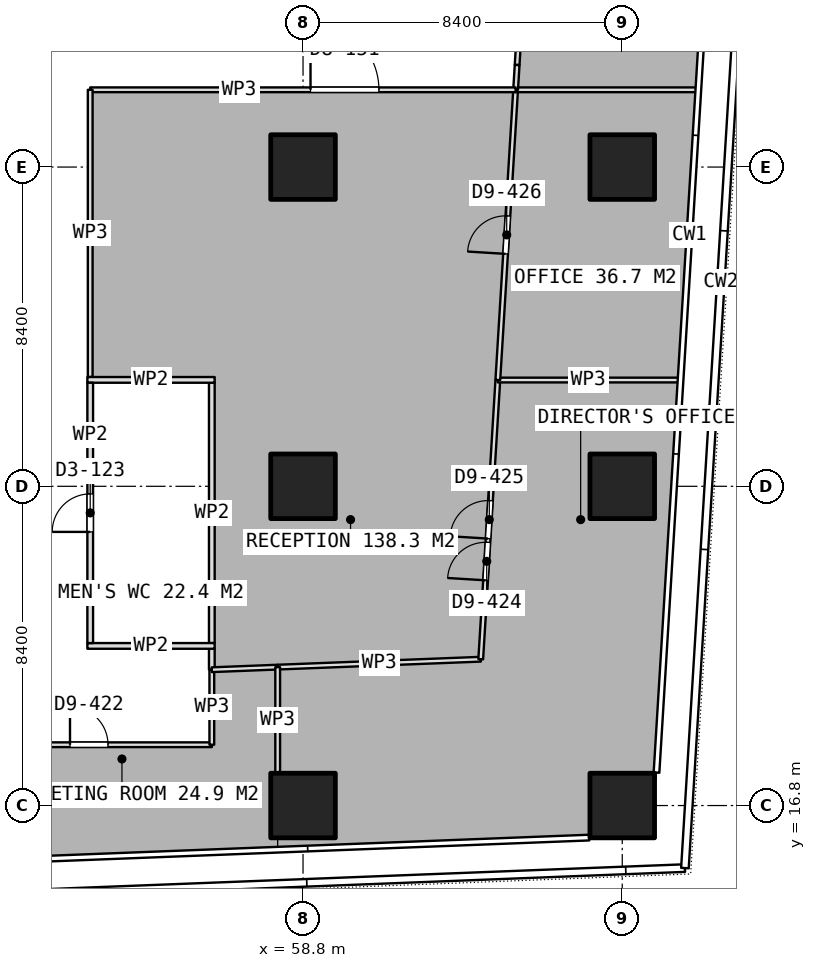
"""IFC4 building model, lengths in metres.
Left out: names, types, materials, properties, quantities, classifications, styles, units other than length and angle.
Written with IfcOpenShell. Run it as: python <this file> out.ifc"""

import sys

from ifc_helpers import new_model, si_unit, direction, frame, frame_2d, origin, origin_2d, place, context, subcontext, project, spatial, rectangle, extrude, element, fill, save


model = new_model("IFC4")
c1 = context("Model", 3, precision=1e-05, world=origin(), true_north=direction((0.0, 1.0)))
c2 = subcontext(c1, "Body", "Model", "MODEL_VIEW")
j1 = project(units=[si_unit("LENGTHUNIT", "METRE"), si_unit("PLANEANGLEUNIT", "RADIAN")], contexts=[c1])
p1 = place(None, origin())
s1 = spatial("IfcSite", under=j1, at=p1, CompositionType="ELEMENT")
p2 = place(p1, origin())
s2 = spatial("IfcBuilding", under=s1, at=p2, CompositionType="ELEMENT")
p3 = place(p2, frame((0.0, 0.0, 117.8)))
s3 = spatial("IfcBuildingStorey", under=s2, at=p3, CompositionType="ELEMENT", Elevation=117.8)
for number, where, z_axis, x_axis in (
    (1, (58.8, 16.8, 0.0), (0.0, 0.0, 1.0), (1.0, 0.0, 0.0)),
    (2, (58.8, 25.2, 0.0), (0.0, 0.0, 1.0), (1.0, 0.0, 0.0)),
    (3, (58.8, 33.6, 0.0), (0.0, 0.0, 1.0), (1.0, 0.0, 0.0)),
    (4, (67.2, 16.8, 0.0), (0.0, 0.0, 1.0), (1.0, 0.0, 0.0)),
    (5, (67.2, 25.2, 0.0), (0.0, 0.0, 1.0), (1.0, 0.0, 0.0)),
    (6, (67.2, 33.6, 0.0), (0.0, 0.0, 1.0), (1.0, 0.0, 0.0)),
):
    element("IfcColumn", number, at=place(p3, frame(where, z_axis=z_axis, x_axis=x_axis)), inside=s3, PredefinedType="COLUMN", context=c2, shape_type="SweptSolid", body=[
        extrude(rectangle(XDim=1.7, YDim=1.7, at=origin_2d()), origin(), (0.0, 0.0, 1.0), 3.75),
    ])
for number, where, z_axis, x_axis in (
    (7, (53.125, 21.0, 0.0), (0.0, 0.0, 1.0), (1.0, 0.0, 0.0)),
    (8, (53.125, 28.0, 0.0), (0.0, 0.0, 1.0), (1.0, 0.0, 0.0)),
):
    element("IfcWall", number, at=place(p3, frame(where, z_axis=z_axis, x_axis=x_axis)), inside=s3, PredefinedType="PARTITIONING", context=c2, shape_type="SweptSolid", body=[
        extrude(rectangle(XDim=3.35, YDim=0.15, at=frame_2d((1.675, 0.0))), origin(), (0.0, 0.0, 1.0), 3.5),
    ])
p4 = place(p3, frame((53.2, 21.075, 0.0), z_axis=(0.0, 0.0, 1.0), x_axis=(0.0, 1.0, 0.0)))
e9 = element("IfcWall", 9, at=p4, inside=s3, PredefinedType="PARTITIONING", context=c2, shape_type="SweptSolid", body=[
    extrude(rectangle(XDim=6.85, YDim=0.15, at=frame_2d((3.425, 0.0))), origin(), (0.0, 0.0, 1.0), 3.5),
])
p5 = place(p4, frame((2.925, 0.0, 0.0)))
e10 = element("IfcOpeningElement", 10, at=p5, cuts=e9, PredefinedType="OPENING", context=c2, shape_type="SweptSolid", body=[
    extrude(rectangle(XDim=1.0, YDim=2.1, at=frame_2d((0.5, 1.05))), frame((0.0, 0.085, 0.0), z_axis=(0.0, -1.0, 0.0), x_axis=(1.0, 0.0, 0.0)), (0.0, 0.0, 1.0), 0.17),
])
p6 = place(p3, frame((56.4, 21.075, 0.0), z_axis=(0.0, 0.0, 1.0), x_axis=(0.0, 1.0, 0.0)))
e11 = element("IfcWall", 11, at=p6, inside=s3, PredefinedType="PARTITIONING", context=c2, shape_type="SweptSolid", body=[
    extrude(rectangle(XDim=6.85, YDim=0.15, at=frame_2d((3.425, 0.0))), origin(), (0.0, 0.0, 1.0), 3.5),
])
p7 = place(p3, frame((49.937, 18.4, 0.0), z_axis=(0.0, 0.0, 1.0), x_axis=(1.0, 0.0, 0.0)))
e12 = element("IfcWall", 12, at=p7, inside=s3, PredefinedType="PARTITIONING", context=c2, shape_type="SweptSolid", body=[
    extrude(rectangle(XDim=6.463, YDim=0.125, at=frame_2d((3.231, 0.0))), origin(), (0.0, 0.0, 1.0), 3.5),
])
p8 = place(p7, frame((2.731, 0.0, 0.0)))
e13 = element("IfcOpeningElement", 13, at=p8, cuts=e12, PredefinedType="OPENING", context=c2, shape_type="SweptSolid", body=[
    extrude(rectangle(XDim=1.0, YDim=2.1, at=frame_2d((0.5, 1.05))), frame((0.0, 0.073, 0.0), z_axis=(0.0, -1.0, 0.0), x_axis=(1.0, 0.0, 0.0)), (0.0, 0.0, 1.0), 0.145),
])
p9 = place(p3, frame((56.4, 18.4, 0.0), z_axis=(0.0, 0.0, 1.0), x_axis=(0.0, 1.0, 0.0)))
e14 = element("IfcWall", 14, at=p9, inside=s3, PredefinedType="PARTITIONING", context=c2, shape_type="SweptSolid", body=[
    extrude(rectangle(XDim=1.974, YDim=0.125, at=frame_2d((0.987, 0.0))), origin(), (0.0, 0.0, 1.0), 3.5),
])
p10 = place(p3, frame((56.4, 20.374, 0.0), z_axis=(0.0, 0.0, 1.0), x_axis=(0.999234110548, 0.039130452561, 0.0)))
e15 = element("IfcWall", 15, at=p10, inside=s3, PredefinedType="PARTITIONING", context=c2, shape_type="SweptSolid", body=[
    extrude(rectangle(XDim=1.734, YDim=0.125, at=frame_2d((0.867, 0.0))), origin(), (0.0, 0.0, 1.0), 3.5),
])
p11 = place(p3, frame((58.133, 20.442, 0.0), z_axis=(0.0, 0.0, 1.0), x_axis=(0.0, -1.0, 0.0)))
e16 = element("IfcWall", 16, at=p11, inside=s3, PredefinedType="PARTITIONING", context=c2, shape_type="SweptSolid", body=[
    extrude(rectangle(XDim=2.772, YDim=0.125, at=frame_2d((1.386, 0.0))), origin(), (0.0, 0.0, 1.0), 3.5),
])
p12 = place(p3, frame((58.134, 20.442, 0.0), z_axis=(0.0, 0.0, 1.0), x_axis=(0.999242781249, 0.03890840682, 0.0)))
e17 = element("IfcWall", 17, at=p12, inside=s3, PredefinedType="PARTITIONING", context=c2, shape_type="SweptSolid", body=[
    extrude(rectangle(XDim=5.346, YDim=0.125, at=frame_2d((2.673, 0.0))), origin(), (0.0, 0.0, 1.0), 3.5),
])
p13 = place(p3, frame((63.476, 20.65, 0.0), z_axis=(0.0, 0.0, 1.0), x_axis=(0.061135017565, 0.998129505439, 0.0)))
e18 = element("IfcWall", 18, at=p13, inside=s3, PredefinedType="PARTITIONING", context=c2, shape_type="SweptSolid", body=[
    extrude(rectangle(XDim=7.36, YDim=0.125, at=frame_2d((3.68, 0.0))), origin(), (0.0, 0.0, 1.0), 3.5),
])
p14 = place(p13, frame((3.18, 0.0, 0.0)))
e19 = element("IfcOpeningElement", 19, at=p14, cuts=e18, PredefinedType="OPENING", context=c2, shape_type="SweptSolid", body=[
    extrude(rectangle(XDim=1.0, YDim=2.1, at=frame_2d((0.5, 1.05))), frame((0.0, 0.073, 0.0), z_axis=(0.0, -1.0, 0.0), x_axis=(1.0, 0.0, 0.0)), (0.0, 0.0, 1.0), 0.145),
])
p15 = place(p13, frame((2.08, 0.0, 0.0)))
e20 = element("IfcOpeningElement", 20, at=p15, cuts=e18, PredefinedType="OPENING", context=c2, shape_type="SweptSolid", body=[
    extrude(rectangle(XDim=1.0, YDim=2.1, at=frame_2d((0.5, 1.05))), frame((0.0, 0.073, 0.0), z_axis=(0.0, -1.0, 0.0), x_axis=(1.0, 0.0, 0.0)), (0.0, 0.0, 1.0), 0.145),
])
p16 = place(p3, frame((63.926, 27.996, 0.0), z_axis=(0.0, 0.0, 1.0), x_axis=(1.0, 0.0, 0.0)))
e21 = element("IfcWall", 21, at=p16, inside=s3, PredefinedType="PARTITIONING", context=c2, shape_type="SweptSolid", body=[
    extrude(rectangle(XDim=4.758, YDim=0.125, at=frame_2d((2.379, 0.0))), origin(), (0.0, 0.0, 1.0), 3.5),
])
p17 = place(p3, frame((63.926, 27.997, 0.0), z_axis=(0.0, 0.0, 1.0), x_axis=(0.061176245149, 0.998126979412, 0.0)))
e22 = element("IfcWall", 22, at=p17, inside=s3, PredefinedType="PARTITIONING", context=c2, shape_type="SweptSolid", body=[
    extrude(rectangle(XDim=7.65, YDim=0.125, at=frame_2d((3.825, 0.0))), origin(), (0.0, 0.0, 1.0), 3.5),
])
p18 = place(p17, frame((3.325, 0.0, 0.0)))
e23 = element("IfcOpeningElement", 23, at=p18, cuts=e22, PredefinedType="OPENING", context=c2, shape_type="SweptSolid", body=[
    extrude(rectangle(XDim=1.0, YDim=2.1, at=frame_2d((0.5, 1.05))), frame((0.0, 0.073, 0.0), z_axis=(0.0, -1.0, 0.0), x_axis=(1.0, 0.0, 0.0)), (0.0, 0.0, 1.0), 0.145),
])
p19 = place(p3, frame((64.394, 35.633, 0.0), z_axis=(0.0, 0.0, 1.0), x_axis=(1.0, 0.0, 0.0)))
e24 = element("IfcWall", 24, at=p19, inside=s3, PredefinedType="PARTITIONING", context=c2, shape_type="SweptSolid", body=[
    extrude(rectangle(XDim=4.758, YDim=0.125, at=frame_2d((2.379, 0.0))), origin(), (0.0, 0.0, 1.0), 3.5),
])
p20 = place(p3, frame((64.434, 36.286, 0.0), z_axis=(0.0, 0.0, 1.0), x_axis=(0.060546193712, 0.998165396328, 0.0)))
e25 = element("IfcWall", 25, at=p20, inside=s3, PredefinedType="PARTITIONING", context=c2, shape_type="SweptSolid", body=[
    extrude(rectangle(XDim=1.153, YDim=0.125, at=frame_2d((0.577, 0.0))), origin(), (0.0, 0.0, 1.0), 3.5),
])
p21 = place(p3, frame((64.394, 35.634, 0.0), z_axis=(0.0, 0.0, 1.0), x_axis=(0.061307678676, 0.998118915027, 0.0)))
e26 = element("IfcWall", 26, at=p21, inside=s3, PredefinedType="PARTITIONING", context=c2, shape_type="SweptSolid", body=[
    extrude(rectangle(XDim=0.653, YDim=0.125, at=frame_2d((0.327, 0.0))), origin(), (0.0, 0.0, 1.0), 3.5),
])
p22 = place(p3, frame((53.2, 35.633, 0.0), z_axis=(0.0, 0.0, 1.0), x_axis=(1.0, 0.0, 0.0)))
e27 = element("IfcWall", 27, at=p22, inside=s3, PredefinedType="PARTITIONING", context=c2, shape_type="SweptSolid", body=[
    extrude(rectangle(XDim=11.194, YDim=0.125, at=frame_2d((5.597, 0.0))), origin(), (0.0, 0.0, 1.0), 3.5),
])
p23 = place(p22, frame((5.797, 0.0, 0.0)))
e28 = element("IfcOpeningElement", 28, at=p23, cuts=e27, PredefinedType="OPENING", context=c2, shape_type="SweptSolid", body=[
    extrude(rectangle(XDim=1.8, YDim=2.1, at=frame_2d((0.9, 1.05))), frame((0.0, 0.073, 0.0), z_axis=(0.0, -1.0, 0.0), x_axis=(1.0, 0.0, 0.0)), (0.0, 0.0, 1.0), 0.145),
])
p24 = place(p3, frame((53.2, 28.075, 0.0), z_axis=(0.0, 0.0, 1.0), x_axis=(0.0, 1.0, 0.0)))
e29 = element("IfcWall", 29, at=p24, inside=s3, PredefinedType="PARTITIONING", context=c2, shape_type="SweptSolid", body=[
    extrude(rectangle(XDim=7.558, YDim=0.125, at=frame_2d((3.779, 0.0))), origin(), (0.0, 0.0, 1.0), 3.5),
])
p25 = place(p3, frame((56.4, 20.374, 0.0), z_axis=(0.0, 0.0, 1.0), x_axis=(0.0, 1.0, 0.0)))
e30 = element("IfcWall", 30, at=p25, inside=s3, PredefinedType="PARTITIONING", context=c2, shape_type="SweptSolid", body=[
    extrude(rectangle(XDim=0.551, YDim=0.15, at=frame_2d((0.275, 0.0))), origin(), (0.0, 0.0, 1.0), 3.5),
])
p26 = place(p5, origin())
e31 = element("IfcDoor", 31, at=p26, inside=s3, OperationType="SINGLE_SWING_LEFT", PredefinedType="DOOR", context=c2, shape_type="SweptSolid", body=[
    extrude(rectangle(XDim=1.0, YDim=2.1, at=frame_2d((0.5, 1.05))), frame((0.0, 0.025, 0.0), z_axis=(0.0, -1.0, 0.0), x_axis=(1.0, 0.0, 0.0)), (0.0, 0.0, 1.0), 0.05),
])
fill(e10, e31)
p27 = place(p8, origin())
e32 = element("IfcDoor", 32, at=p27, inside=s3, OperationType="SINGLE_SWING_LEFT", PredefinedType="DOOR", context=c2, shape_type="SweptSolid", body=[
    extrude(rectangle(XDim=1.0, YDim=2.1, at=frame_2d((0.5, 1.05))), frame((0.0, 0.025, 0.0), z_axis=(0.0, -1.0, 0.0), x_axis=(1.0, 0.0, 0.0)), (0.0, 0.0, 1.0), 0.05),
])
fill(e13, e32)
p28 = place(p14, origin())
e33 = element("IfcDoor", 33, at=p28, inside=s3, OperationType="SINGLE_SWING_LEFT", PredefinedType="DOOR", context=c2, shape_type="SweptSolid", body=[
    extrude(rectangle(XDim=1.0, YDim=2.1, at=frame_2d((0.5, 1.05))), frame((0.0, 0.025, 0.0), z_axis=(0.0, -1.0, 0.0), x_axis=(1.0, 0.0, 0.0)), (0.0, 0.0, 1.0), 0.05),
])
fill(e19, e33)
p29 = place(p23, origin())
e34 = element("IfcDoor", 34, at=p29, inside=s3, OperationType="DOUBLE_DOOR_SINGLE_SWING", PredefinedType="DOOR", context=c2, shape_type="SweptSolid", body=[
    extrude(rectangle(XDim=1.8, YDim=2.1, at=frame_2d((0.9, 1.05))), frame((0.0, 0.025, 0.0), z_axis=(0.0, -1.0, 0.0), x_axis=(1.0, 0.0, 0.0)), (0.0, 0.0, 1.0), 0.05),
])
fill(e28, e34)
p30 = place(p18, origin())
e35 = element("IfcDoor", 35, at=p30, inside=s3, OperationType="SINGLE_SWING_LEFT", PredefinedType="DOOR", context=c2, shape_type="SweptSolid", body=[
    extrude(rectangle(XDim=1.0, YDim=2.1, at=frame_2d((0.5, 1.05))), frame((0.0, 0.025, 0.0), z_axis=(0.0, -1.0, 0.0), x_axis=(1.0, 0.0, 0.0)), (0.0, 0.0, 1.0), 0.05),
])
fill(e23, e35)
p31 = place(p15, origin())
e36 = element("IfcDoor", 36, at=p31, inside=s3, OperationType="SINGLE_SWING_LEFT", PredefinedType="DOOR", context=c2, shape_type="SweptSolid", body=[
    extrude(rectangle(XDim=1.0, YDim=2.1, at=frame_2d((0.5, 1.05))), frame((0.0, 0.025, 0.0), z_axis=(0.0, -1.0, 0.0), x_axis=(1.0, 0.0, 0.0)), (0.0, 0.0, 1.0), 0.05),
])
fill(e20, e36)
save(model, sys.argv[1])
